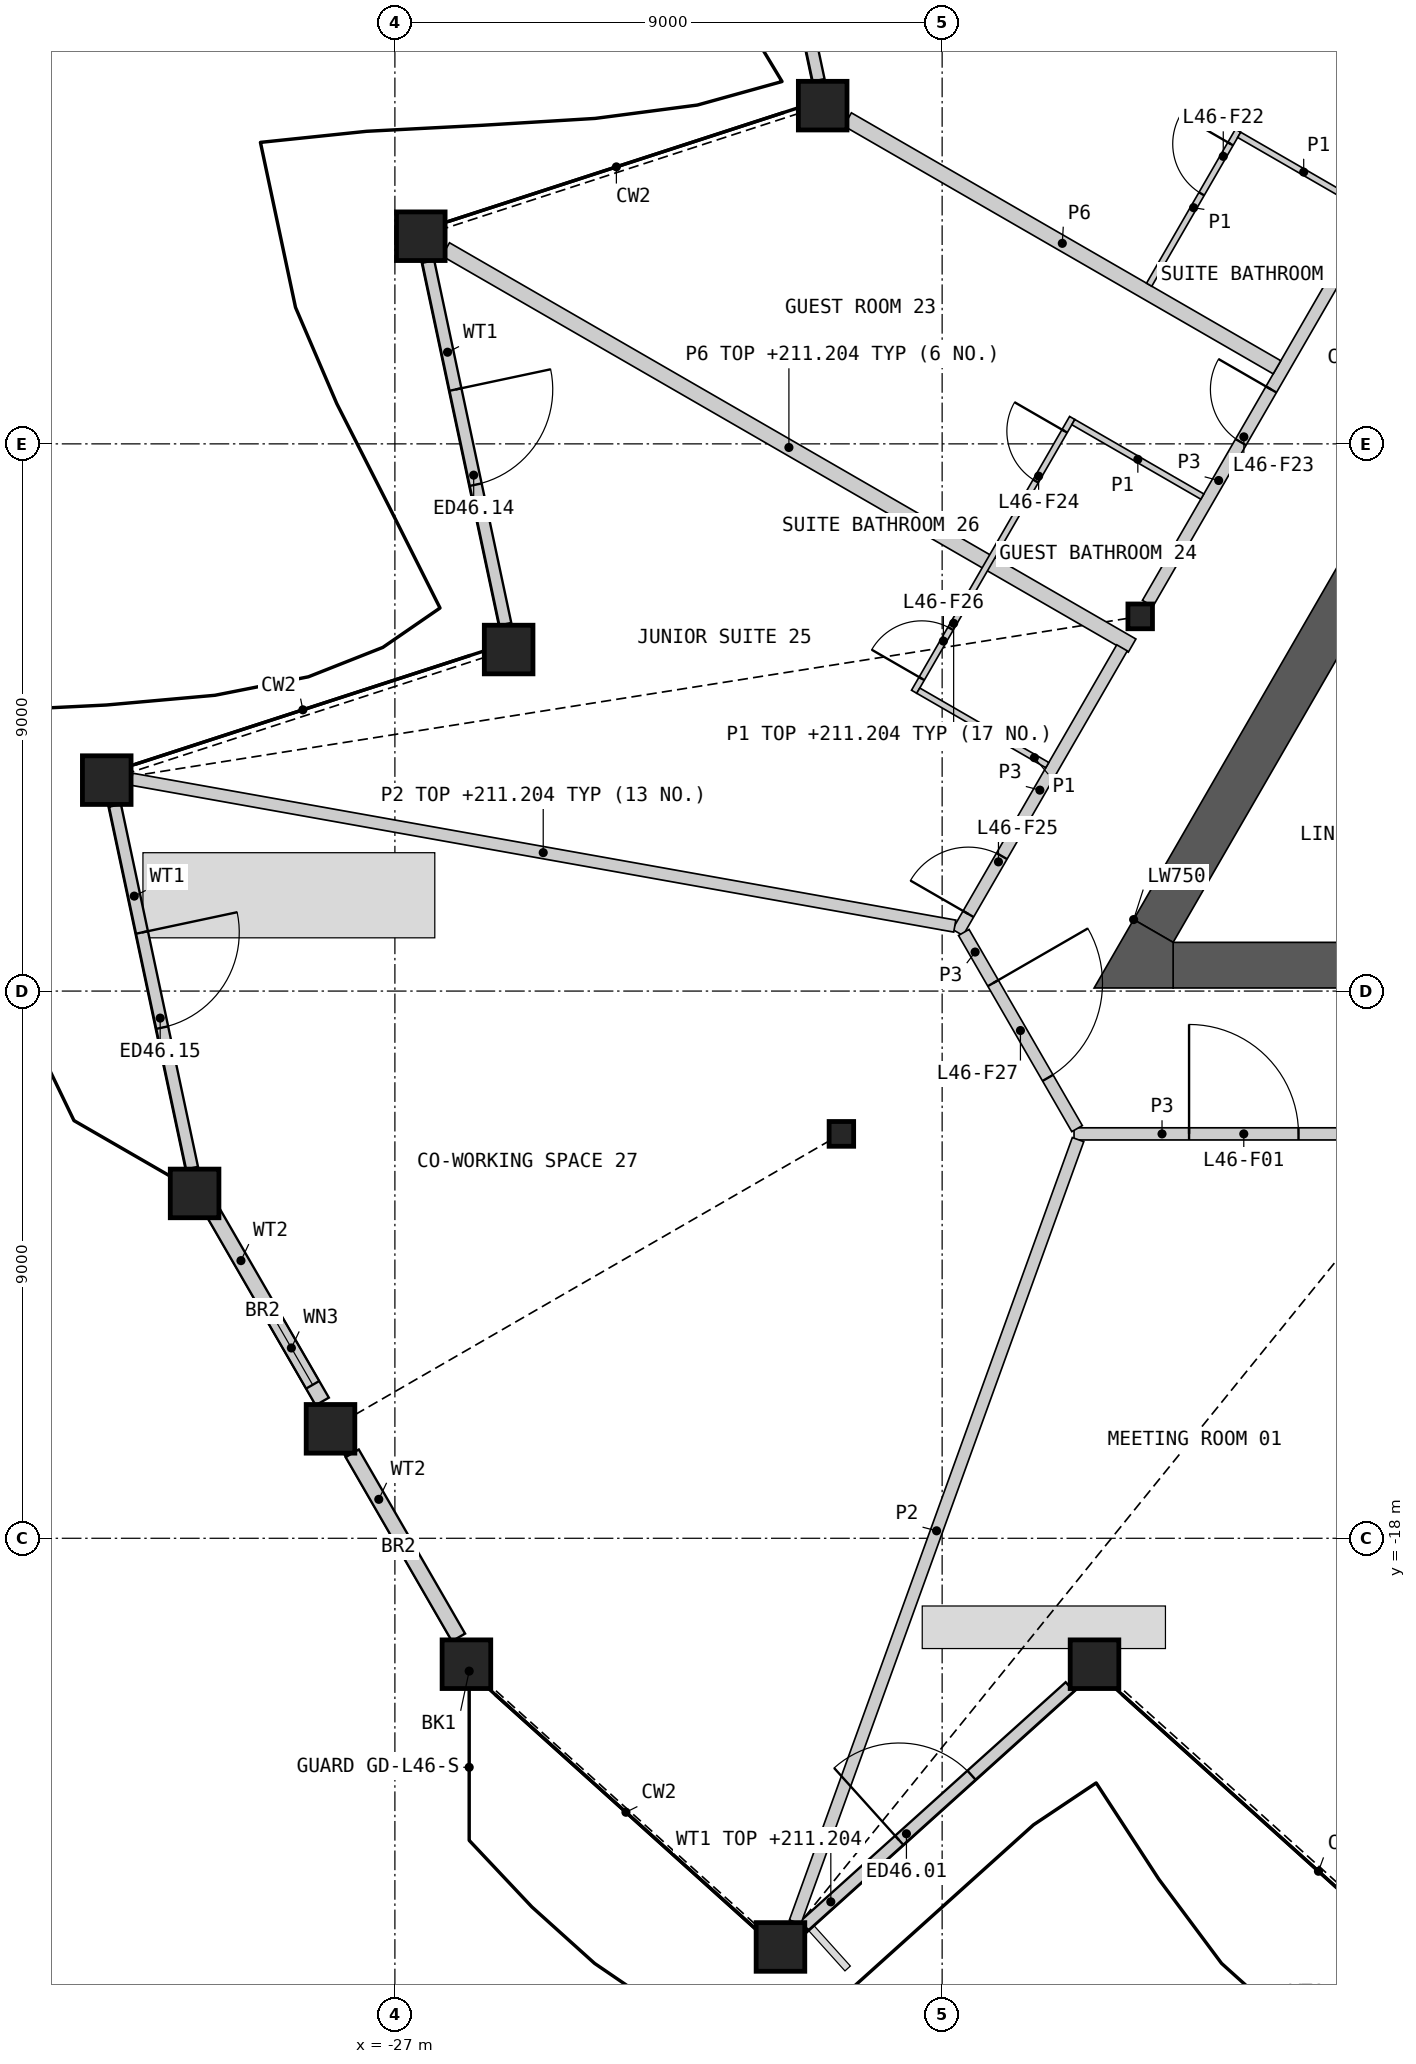
"""IFC4 building model, lengths in metres.
Left out: names, types, materials, properties, quantities, classifications, styles, units other than length and angle.
Written with IfcOpenShell. Run it as: python <this file> out.ifc"""

import sys

from ifc_helpers import new_model, si_unit, direction, frame, frame_2d, origin, origin_2d, place, context, subcontext, project, spatial, polyline, rectangle, hollow_rectangle, i_section, outline, extrude, element, fill, save


model = new_model("IFC4")
c1 = context("Model", 3, precision=1e-05, world=origin(), true_north=direction((0.0, 1.0)))
c2 = subcontext(c1, "Body", "Model", "MODEL_VIEW")
j1 = project(units=[si_unit("LENGTHUNIT", "METRE"), si_unit("PLANEANGLEUNIT", "RADIAN")], contexts=[c1])
p1 = place(None, origin())
s1 = spatial("IfcSite", under=j1, at=p1, CompositionType="ELEMENT")
p2 = place(p1, origin())
s2 = spatial("IfcBuilding", under=s1, at=p2, CompositionType="ELEMENT")
p3 = place(p2, frame((0.0, 0.0, 208.8)))
s3 = spatial("IfcBuildingStorey", under=s2, at=p3, CompositionType="ELEMENT", Elevation=208.8)
for number, where, z_axis, x_axis in (
    (1, (-25.823, -20.071, 0.0), (0.0, 0.0, 1.0), (1.0, 0.0, 0.0)),
    (2, (-20.659, -24.722, 0.0), (0.0, 0.0, 1.0), (1.0, 0.0, 0.0)),
    (3, (-15.494, -20.071, 0.0), (0.0, 0.0, 1.0), (1.0, 0.0, 0.0)),
    (4, (-19.965, 5.563, 0.0), (0.0, 0.0, 1.0), (1.0, 0.0, 0.0)),
    (5, (-26.574, 3.415, 0.0), (0.0, 0.0, 1.0), (1.0, 0.0, 0.0)),
    (6, (-25.129, -3.383, 0.0), (0.0, 0.0, 1.0), (1.0, 0.0, 0.0)),
    (7, (-31.739, -5.53, 0.0), (0.0, 0.0, 1.0), (1.0, 0.0, 0.0)),
    (8, (-30.294, -12.328, 0.0), (0.0, 0.0, 1.0), (1.0, 0.0, 0.0)),
    (9, (-28.059, -16.2, 0.0), (0.0, 0.0, 1.0), (1.0, 0.0, 0.0)),
):
    element("IfcColumn", number, at=place(p3, frame(where, z_axis=z_axis, x_axis=x_axis)), inside=s3, PredefinedType="COLUMN", context=c2, shape_type="SweptSolid", body=[
        extrude(hollow_rectangle(XDim=0.8, YDim=0.8, WallThickness=0.05, at=origin_2d()), origin(), (0.0, 0.0, 1.0), 3.6),
    ])
for number, where, z_axis, x_axis in (
    (10, (-14.743, -2.837, 0.0), (0.0, 0.0, 1.0), (1.0, 0.0, 0.0)),
    (11, (-19.657, -11.349, 0.0), (0.0, 0.0, 1.0), (1.0, 0.0, 0.0)),
):
    element("IfcColumn", number, at=place(p3, frame(where, z_axis=z_axis, x_axis=x_axis)), inside=s3, PredefinedType="COLUMN", context=c2, shape_type="SweptSolid", body=[
        extrude(i_section(OverallWidth=0.404, OverallDepth=0.407, WebThickness=0.027, FlangeThickness=0.044, at=origin_2d()), origin(), (0.0, 0.0, 1.0), 3.6),
    ])
p4 = place(p3, frame((-20.267, -24.373, 0.0), z_axis=(0.0, 0.0, 1.0), x_axis=(0.743163950832, 0.669109364891, 0.0)))
e12 = element("IfcWall", 12, at=p4, inside=s3, PredefinedType="SOLIDWALL", context=c2, shape_type="SweptSolid", body=[
    extrude(rectangle(XDim=5.875, YDim=0.2, at=frame_2d((2.938, 0.0))), origin(), (0.0, 0.0, 1.0), 2.404),
])
p5 = place(p4, frame((2.101, 0.0, 0.0)))
e13 = element("IfcOpeningElement", 13, at=p5, cuts=e12, PredefinedType="OPENING", context=c2, shape_type="SweptSolid", body=[
    extrude(rectangle(XDim=1.6, YDim=2.4, at=frame_2d((0.8, 1.2))), frame((0.0, 0.11, 0.0), z_axis=(0.0, -1.0, 0.0), x_axis=(1.0, 0.0, 0.0)), (0.0, 0.0, 1.0), 0.22),
])
p6 = place(p3, frame((-21.299, 11.944, 0.0), z_axis=(0.0, 0.0, 1.0), x_axis=(0.207912864597, -0.978147351238, 0.0)))
e14 = element("IfcWall", 14, at=p6, inside=s3, PredefinedType="SOLIDWALL", context=c2, shape_type="SweptSolid", body=[
    extrude(rectangle(XDim=6.098, YDim=0.2, at=frame_2d((3.049, 0.0))), origin(), (0.0, 0.0, 1.0), 2.701),
])
p7 = place(p6, frame((2.168, 0.0, 0.0)))
e15 = element("IfcOpeningElement", 15, at=p7, cuts=e14, PredefinedType="OPENING", context=c2, shape_type="SweptSolid", body=[
    extrude(rectangle(XDim=1.6, YDim=2.4, at=frame_2d((0.8, 1.2))), frame((0.0, 0.11, 0.0), z_axis=(0.0, -1.0, 0.0), x_axis=(1.0, 0.0, 0.0)), (0.0, 0.0, 1.0), 0.22),
])
p8 = place(p3, frame((-26.451, 2.999, 0.0), z_axis=(0.0, 0.0, 1.0), x_axis=(0.207912864597, -0.978147351238, 0.0)))
e16 = element("IfcWall", 16, at=p8, inside=s3, PredefinedType="SOLIDWALL", context=c2, shape_type="SweptSolid", body=[
    extrude(rectangle(XDim=6.098, YDim=0.2, at=frame_2d((3.049, 0.0))), origin(), (0.0, 0.0, 1.0), 2.701),
])
p9 = place(p8, frame((2.152, 0.0, 0.0)))
e17 = element("IfcOpeningElement", 17, at=p9, cuts=e16, PredefinedType="OPENING", context=c2, shape_type="SweptSolid", body=[
    extrude(rectangle(XDim=1.6, YDim=2.4, at=frame_2d((0.8, 1.2))), frame((0.0, 0.11, 0.0), z_axis=(0.0, -1.0, 0.0), x_axis=(1.0, 0.0, 0.0)), (0.0, 0.0, 1.0), 0.22),
])
p10 = place(p3, frame((-31.604, -5.947, 0.0), z_axis=(0.0, 0.0, 1.0), x_axis=(0.207912864597, -0.978147351238, 0.0)))
e18 = element("IfcWall", 18, at=p10, inside=s3, PredefinedType="SOLIDWALL", context=c2, shape_type="SweptSolid", body=[
    extrude(rectangle(XDim=6.098, YDim=0.2, at=frame_2d((3.049, 0.0))), origin(), (0.0, 0.0, 1.0), 2.701),
])
p11 = place(p10, frame((2.135, 0.0, 0.0)))
e19 = element("IfcOpeningElement", 19, at=p11, cuts=e18, PredefinedType="OPENING", context=c2, shape_type="SweptSolid", body=[
    extrude(rectangle(XDim=1.6, YDim=2.4, at=frame_2d((0.8, 1.2))), frame((0.0, 0.11, 0.0), z_axis=(0.0, -1.0, 0.0), x_axis=(1.0, 0.0, 0.0)), (0.0, 0.0, 1.0), 0.22),
])
p12 = place(p3, frame((-29.978, -12.662, 0.0), z_axis=(0.0, 0.0, 1.0), x_axis=(0.500004952373, -0.866022544512, 0.0)))
e20 = element("IfcWall", 20, at=p12, inside=s3, PredefinedType="SOLIDWALL", context=c2, shape_type="SweptSolid", body=[
    extrude(rectangle(XDim=3.566, YDim=0.25, at=frame_2d((1.783, 0.0))), origin(), (0.0, 0.0, 1.0), 2.701),
])
p13 = place(p12, frame((1.85, 0.0, 1.7)))
e21 = element("IfcOpeningElement", 21, at=p13, cuts=e20, PredefinedType="OPENING", context=c2, shape_type="SweptSolid", body=[
    extrude(rectangle(XDim=1.4, YDim=0.8, at=frame_2d((0.7, 0.4))), frame((0.0, 0.135, 0.0), z_axis=(0.0, -1.0, 0.0), x_axis=(1.0, 0.0, 0.0)), (0.0, 0.0, 1.0), 0.27),
])
p14 = place(p3, frame((-27.702, -16.603, 0.0), z_axis=(0.0, 0.0, 1.0), x_axis=(0.500006525586, -0.866021636203, 0.0)))
e22 = element("IfcWall", 22, at=p14, inside=s3, PredefinedType="SOLIDWALL", context=c2, shape_type="SweptSolid", body=[
    extrude(rectangle(XDim=3.497, YDim=0.25, at=frame_2d((1.748, 0.0))), origin(), (0.0, 0.0, 1.0), 2.701),
])
p15 = place(p3, frame((-14.201, -8.574, 0.0), z_axis=(0.0, 0.0, 1.0), x_axis=(1.0, 0.0, 0.0)))
e23 = element("IfcWall", 23, at=p15, inside=s3, PredefinedType="SHEAR", context=c2, shape_type="SweptSolid", body=[
    extrude(rectangle(XDim=3.798, YDim=0.75, at=frame_2d((1.899, 0.0))), origin(), (0.0, 0.0, 1.0), 3.25),
])
p16 = place(p3, frame((-9.625, 0.477, 0.0), z_axis=(0.0, 0.0, 1.0), x_axis=(-0.499986234705, -0.866033351035, 0.0)))
e24 = element("IfcWall", 24, at=p16, inside=s3, PredefinedType="SHEAR", context=c2, shape_type="SweptSolid", body=[
    extrude(rectangle(XDim=9.801, YDim=0.75, at=frame_2d((4.9, 0.0))), origin(), (0.0, 0.0, 1.0), 3.25),
])
p17 = place(p3, origin())
e25 = element("IfcWall", 25, at=p17, inside=s3, PredefinedType="SHEAR", context=c2, shape_type="SweptSolid", body=[
    extrude(outline(polyline([(-14.851, -7.824), (-14.201, -8.199), (-14.201, -8.949), (-15.5, -8.949), (-14.851, -7.824)])), origin(), (0.0, 0.0, 1.0), 3.25),
])
p18 = place(p3, frame((-26.164, 3.199, 0.0), z_axis=(0.0, 0.0, 1.0), x_axis=(0.866029635251, -0.499992670813, 0.0)))
e26 = element("IfcWall", 26, at=p18, inside=s3, PredefinedType="PARTITIONING", context=c2, shape_type="SweptSolid", body=[
    extrude(rectangle(XDim=13.035, YDim=0.25, at=frame_2d((6.518, 0.0))), origin(), (0.0, 0.0, 1.0), 2.404),
])
p19 = place(p3, frame((-14.619, -2.624, 0.0), z_axis=(0.0, 0.0, 1.0), x_axis=(0.50000393355, 0.866023132736, 0.0)))
e27 = element("IfcWall", 27, at=p19, inside=s3, PredefinedType="PARTITIONING", context=c2, shape_type="SweptSolid", body=[
    extrude(rectangle(XDim=9.335, YDim=0.2, at=frame_2d((4.667, 0.0))), origin(), (0.0, 0.0, 1.0), 3.25),
])
p20 = place(p19, frame((3.062, 0.0, 0.0)))
e28 = element("IfcOpeningElement", 28, at=p20, cuts=e27, PredefinedType="OPENING", context=c2, shape_type="SweptSolid", body=[
    extrude(rectangle(XDim=1.0, YDim=2.1, at=frame_2d((0.5, 1.05))), frame((0.0, 0.11, 0.0), z_axis=(0.0, -1.0, 0.0), x_axis=(1.0, 0.0, 0.0)), (0.0, 0.0, 1.0), 0.22),
])
p21 = place(p3, frame((-19.555, 5.337, 0.0), z_axis=(0.0, 0.0, 1.0), x_axis=(0.866023543838, -0.500003221507, 0.0)))
e29 = element("IfcWall", 29, at=p21, inside=s3, PredefinedType="PARTITIONING", context=c2, shape_type="SweptSolid", body=[
    extrude(rectangle(XDim=8.154, YDim=0.25, at=frame_2d((4.077, 0.0))), origin(), (0.0, 0.0, 1.0), 2.404),
])
p22 = place(p3, frame((-15.831, -11.349, 0.0), z_axis=(0.0, 0.0, 1.0), x_axis=(1.0, 0.0, 0.0)))
e30 = element("IfcWall", 30, at=p22, inside=s3, PredefinedType="PARTITIONING", context=c2, shape_type="SweptSolid", body=[
    extrude(rectangle(XDim=5.789, YDim=0.2, at=frame_2d((2.894, 0.0))), origin(), (0.0, 0.0, 1.0), 3.25),
])
p23 = place(p22, frame((1.892, 0.0, 0.0)))
e31 = element("IfcOpeningElement", 31, at=p23, cuts=e30, PredefinedType="OPENING", context=c2, shape_type="SweptSolid", body=[
    extrude(rectangle(XDim=1.8, YDim=2.1, at=frame_2d((0.9, 1.05))), frame((0.0, 0.11, 0.0), z_axis=(0.0, -1.0, 0.0), x_axis=(1.0, 0.0, 0.0)), (0.0, 0.0, 1.0), 0.22),
])
p24 = place(p3, frame((-17.744, -8.035, 0.0), z_axis=(0.0, 0.0, 1.0), x_axis=(0.500020937221, 0.866013315337, 0.0)))
e32 = element("IfcWall", 32, at=p24, inside=s3, PredefinedType="PARTITIONING", context=c2, shape_type="SweptSolid", body=[
    extrude(rectangle(XDim=5.405, YDim=0.2, at=frame_2d((2.702, 0.0))), origin(), (0.0, 0.0, 1.0), 3.25),
])
p25 = place(p24, frame((0.35, 0.0, 0.0)))
e33 = element("IfcOpeningElement", 33, at=p25, cuts=e32, PredefinedType="OPENING", context=c2, shape_type="SweptSolid", body=[
    extrude(rectangle(XDim=1.1, YDim=2.1, at=frame_2d((0.55, 1.05))), frame((0.0, 0.11, 0.0), z_axis=(0.0, -1.0, 0.0), x_axis=(1.0, 0.0, 0.0)), (0.0, 0.0, 1.0), 0.22),
])
p26 = place(p3, frame((-17.644, -8.035, 0.0), z_axis=(0.0, 0.0, 1.0), x_axis=(0.499958791762, -0.866049194065, 0.0)))
e34 = element("IfcWall", 34, at=p26, inside=s3, PredefinedType="PARTITIONING", context=c2, shape_type="SweptSolid", body=[
    extrude(rectangle(XDim=3.726, YDim=0.2, at=frame_2d((1.863, 0.0))), origin(), (0.0, 0.0, 1.0), 3.25),
])
p27 = place(p26, frame((0.963, 0.0, 0.0)))
e35 = element("IfcOpeningElement", 35, at=p27, cuts=e34, PredefinedType="OPENING", context=c2, shape_type="SweptSolid", body=[
    extrude(rectangle(XDim=1.8, YDim=2.1, at=frame_2d((0.9, 1.05))), frame((0.0, 0.11, 0.0), z_axis=(0.0, -1.0, 0.0), x_axis=(1.0, 0.0, 0.0)), (0.0, 0.0, 1.0), 0.22),
])
p28 = place(p3, frame((-31.329, -5.515, 0.0), z_axis=(0.0, 0.0, 1.0), x_axis=(0.98444063089, -0.17571751265, 0.0)))
e36 = element("IfcWall", 36, at=p28, inside=s3, PredefinedType="PARTITIONING", context=c2, shape_type="SweptSolid", body=[
    extrude(rectangle(XDim=13.751, YDim=0.2, at=frame_2d((6.875, 0.0))), origin(), (0.0, 0.0, 1.0), 2.404),
])
p29 = place(p3, frame((-20.418, -24.312, 0.0), z_axis=(0.0, 0.0, 1.0), x_axis=(0.340057865258, 0.940404513109, 0.0)))
e37 = element("IfcWall", 37, at=p29, inside=s3, PredefinedType="PARTITIONING", context=c2, shape_type="SweptSolid", body=[
    extrude(rectangle(XDim=13.684, YDim=0.2, at=frame_2d((6.842, 0.0))), origin(), (0.0, 0.0, 1.0), 2.404),
])
p30 = place(p3, frame((-18.461, -4.077, 0.0), z_axis=(0.0, 0.0, 1.0), x_axis=(0.499971721724, 0.866041729639, 0.0)))
e38 = element("IfcWall", 38, at=p30, inside=s3, PredefinedType="PARTITIONING", context=c2, shape_type="SweptSolid", body=[
    extrude(rectangle(XDim=5.2, YDim=0.1, at=frame_2d((2.6, 0.0))), origin(), (0.0, 0.0, 1.0), 2.404),
])
p31 = place(p30, frame((4.0, 0.0, 0.0)))
e39 = element("IfcOpeningElement", 39, at=p31, cuts=e38, PredefinedType="OPENING", context=c2, shape_type="SweptSolid", body=[
    extrude(rectangle(XDim=0.95, YDim=2.1, at=frame_2d((0.475, 1.05))), frame((0.0, 0.06, 0.0), z_axis=(0.0, -1.0, 0.0), x_axis=(1.0, 0.0, 0.0)), (0.0, 0.0, 1.0), 0.12),
])
p32 = place(p30, frame((0.25, 0.0, 0.0)))
e40 = element("IfcOpeningElement", 40, at=p32, cuts=e38, PredefinedType="OPENING", context=c2, shape_type="SweptSolid", body=[
    extrude(rectangle(XDim=0.95, YDim=2.1, at=frame_2d((0.475, 1.05))), frame((0.0, 0.06, 0.0), z_axis=(0.0, -1.0, 0.0), x_axis=(1.0, 0.0, 0.0)), (0.0, 0.0, 1.0), 0.12),
])
p33 = place(p3, frame((-14.595, 2.618, 0.0), z_axis=(0.0, 0.0, 1.0), x_axis=(0.500062034277, 0.865989585315, 0.0)))
e41 = element("IfcWall", 41, at=p33, inside=s3, PredefinedType="PARTITIONING", context=c2, shape_type="SweptSolid", body=[
    extrude(rectangle(XDim=2.925, YDim=0.1, at=frame_2d((1.462, 0.0))), origin(), (0.0, 0.0, 1.0), 2.404),
])
p34 = place(p33, frame((1.725, 0.0, 0.0)))
e42 = element("IfcOpeningElement", 42, at=p34, cuts=e41, PredefinedType="OPENING", context=c2, shape_type="SweptSolid", body=[
    extrude(rectangle(XDim=0.95, YDim=2.1, at=frame_2d((0.475, 1.05))), frame((0.0, 0.06, 0.0), z_axis=(0.0, -1.0, 0.0), x_axis=(1.0, 0.0, 0.0)), (0.0, 0.0, 1.0), 0.12),
])
p35 = place(p3, frame((-18.393, -4.059, 0.0), z_axis=(0.0, 0.0, 1.0), x_axis=(0.866057815567, -0.499943856944, 0.0)))
e43 = element("IfcWall", 43, at=p35, inside=s3, PredefinedType="PARTITIONING", context=c2, shape_type="SweptSolid", body=[
    extrude(rectangle(XDim=2.45, YDim=0.1, at=frame_2d((1.225, 0.0))), origin(), (0.0, 0.0, 1.0), 2.404),
])
p36 = place(p3, frame((-15.843, 0.358, 0.0), z_axis=(0.0, 0.0, 1.0), x_axis=(0.866014668023, -0.500018594424, 0.0)))
e44 = element("IfcWall", 44, at=p36, inside=s3, PredefinedType="PARTITIONING", context=c2, shape_type="SweptSolid", body=[
    extrude(rectangle(XDim=2.45, YDim=0.1, at=frame_2d((1.225, 0.0))), origin(), (0.0, 0.0, 1.0), 2.404),
])
p37 = place(p3, frame((-13.115, 5.083, 0.0), z_axis=(0.0, 0.0, 1.0), x_axis=(0.866032905446, -0.499987006516, 0.0)))
e45 = element("IfcWall", 45, at=p37, inside=s3, PredefinedType="PARTITIONING", context=c2, shape_type="SweptSolid", body=[
    extrude(rectangle(XDim=2.45, YDim=0.1, at=frame_2d((1.225, 0.0))), origin(), (0.0, 0.0, 1.0), 2.404),
])
p38 = place(p5, origin())
e46 = element("IfcDoor", 46, at=p38, inside=s3, OperationType="DOUBLE_DOOR_SINGLE_SWING", PredefinedType="DOOR", context=c2, shape_type="SweptSolid", body=[
    extrude(rectangle(XDim=1.6, YDim=2.4, at=frame_2d((0.8, 1.2))), frame((0.0, 0.025, 0.0), z_axis=(0.0, -1.0, 0.0), x_axis=(1.0, 0.0, 0.0)), (0.0, 0.0, 1.0), 0.05),
])
fill(e13, e46)
p39 = place(p9, origin())
e47 = element("IfcDoor", 47, at=p39, inside=s3, OperationType="DOUBLE_DOOR_SINGLE_SWING", PredefinedType="DOOR", context=c2, shape_type="SweptSolid", body=[
    extrude(rectangle(XDim=1.6, YDim=2.4, at=frame_2d((0.8, 1.2))), frame((0.0, 0.025, 0.0), z_axis=(0.0, -1.0, 0.0), x_axis=(1.0, 0.0, 0.0)), (0.0, 0.0, 1.0), 0.05),
])
fill(e17, e47)
p40 = place(p11, origin())
e48 = element("IfcDoor", 48, at=p40, inside=s3, OperationType="DOUBLE_DOOR_SINGLE_SWING", PredefinedType="DOOR", context=c2, shape_type="SweptSolid", body=[
    extrude(rectangle(XDim=1.6, YDim=2.4, at=frame_2d((0.8, 1.2))), frame((0.0, 0.025, 0.0), z_axis=(0.0, -1.0, 0.0), x_axis=(1.0, 0.0, 0.0)), (0.0, 0.0, 1.0), 0.05),
])
fill(e19, e48)
p41 = place(p13, origin())
e49 = element("IfcWindow", 49, at=p41, inside=s3, PartitioningType="SINGLE_PANEL", PredefinedType="WINDOW", context=c2, shape_type="SweptSolid", body=[
    extrude(rectangle(XDim=1.4, YDim=0.8, at=frame_2d((0.7, 0.4))), frame((0.0, 0.03, 0.0), z_axis=(0.0, -1.0, 0.0), x_axis=(1.0, 0.0, 0.0)), (0.0, 0.0, 1.0), 0.06),
])
fill(e21, e49)
p42 = place(p23, origin())
e50 = element("IfcDoor", 50, at=p42, inside=s3, OperationType="DOUBLE_DOOR_SINGLE_SWING", PredefinedType="DOOR", context=c2, shape_type="SweptSolid", body=[
    extrude(rectangle(XDim=1.8, YDim=2.1, at=frame_2d((0.9, 1.05))), frame((0.0, 0.025, 0.0), z_axis=(0.0, -1.0, 0.0), x_axis=(1.0, 0.0, 0.0)), (0.0, 0.0, 1.0), 0.05),
])
fill(e31, e50)
p43 = place(p34, origin())
e51 = element("IfcDoor", 51, at=p43, inside=s3, OperationType="SINGLE_SWING_RIGHT", PredefinedType="DOOR", context=c2, shape_type="SweptSolid", body=[
    extrude(rectangle(XDim=0.95, YDim=2.1, at=frame_2d((0.475, 1.05))), frame((0.0, 0.025, 0.0), z_axis=(0.0, -1.0, 0.0), x_axis=(1.0, 0.0, 0.0)), (0.0, 0.0, 1.0), 0.05),
])
fill(e42, e51)
p44 = place(p20, origin())
e52 = element("IfcDoor", 52, at=p44, inside=s3, OperationType="SINGLE_SWING_RIGHT", PredefinedType="DOOR", context=c2, shape_type="SweptSolid", body=[
    extrude(rectangle(XDim=1.0, YDim=2.1, at=frame_2d((0.5, 1.05))), frame((0.0, 0.025, 0.0), z_axis=(0.0, -1.0, 0.0), x_axis=(1.0, 0.0, 0.0)), (0.0, 0.0, 1.0), 0.05),
])
fill(e28, e52)
p45 = place(p31, origin())
e53 = element("IfcDoor", 53, at=p45, inside=s3, OperationType="SINGLE_SWING_RIGHT", PredefinedType="DOOR", context=c2, shape_type="SweptSolid", body=[
    extrude(rectangle(XDim=0.95, YDim=2.1, at=frame_2d((0.475, 1.05))), frame((0.0, 0.025, 0.0), z_axis=(0.0, -1.0, 0.0), x_axis=(1.0, 0.0, 0.0)), (0.0, 0.0, 1.0), 0.05),
])
fill(e39, e53)
p46 = place(p25, origin())
e54 = element("IfcDoor", 54, at=p46, inside=s3, OperationType="SINGLE_SWING_LEFT", PredefinedType="DOOR", context=c2, shape_type="SweptSolid", body=[
    extrude(rectangle(XDim=1.1, YDim=2.1, at=frame_2d((0.55, 1.05))), frame((0.0, 0.025, 0.0), z_axis=(0.0, -1.0, 0.0), x_axis=(1.0, 0.0, 0.0)), (0.0, 0.0, 1.0), 0.05),
])
fill(e33, e54)
p47 = place(p32, origin())
e55 = element("IfcDoor", 55, at=p47, inside=s3, OperationType="SINGLE_SWING_LEFT", PredefinedType="DOOR", context=c2, shape_type="SweptSolid", body=[
    extrude(rectangle(XDim=0.95, YDim=2.1, at=frame_2d((0.475, 1.05))), frame((0.0, 0.025, 0.0), z_axis=(0.0, -1.0, 0.0), x_axis=(1.0, 0.0, 0.0)), (0.0, 0.0, 1.0), 0.05),
])
fill(e40, e55)
p48 = place(p27, origin())
e56 = element("IfcDoor", 56, at=p48, inside=s3, OperationType="DOUBLE_DOOR_SINGLE_SWING", PredefinedType="DOOR", context=c2, shape_type="SweptSolid", body=[
    extrude(rectangle(XDim=1.8, YDim=2.1, at=frame_2d((0.9, 1.05))), frame((0.0, 0.025, 0.0), z_axis=(0.0, -1.0, 0.0), x_axis=(1.0, 0.0, 0.0)), (0.0, 0.0, 1.0), 0.05),
])
fill(e35, e56)
save(model, sys.argv[1])
